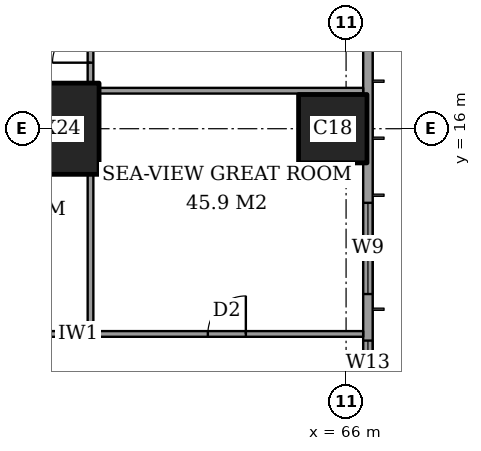
"""IFC4 building model, lengths in metres.
Left out: names, types, materials, properties, quantities, classifications, styles, units other than length and angle.
Written with IfcOpenShell. Run it as: python <this file> out.ifc"""

import sys

from ifc_helpers import new_model, si_unit, direction, frame, frame_2d, origin, origin_2d, place, context, subcontext, project, spatial, rectangle, extrude, element, fill, save


model = new_model("IFC4")
c1 = context("Model", 3, precision=1e-05, world=origin(), true_north=direction((0.0, 1.0)))
c2 = subcontext(c1, "Body", "Model", "MODEL_VIEW")
j1 = project(units=[si_unit("LENGTHUNIT", "METRE"), si_unit("PLANEANGLEUNIT", "RADIAN")], contexts=[c1])
p1 = place(None, origin())
s1 = spatial("IfcSite", under=j1, at=p1, CompositionType="ELEMENT")
p2 = place(p1, origin())
s2 = spatial("IfcBuilding", under=s1, at=p2, CompositionType="ELEMENT")
p3 = place(p2, frame((0.0, 0.0, 196.6)))
s3 = spatial("IfcBuildingStorey", under=s2, at=p3, CompositionType="ELEMENT", Elevation=196.6)
p4 = place(p3, frame((58.0, 16.0, 0.0), z_axis=(0.0, 0.0, 1.0), x_axis=(1.0, 0.0, 0.0)))
e1 = element("IfcColumn", 1, at=p4, inside=s3, PredefinedType="COLUMN", context=c2, shape_type="SweptSolid", body=[
    extrude(rectangle(XDim=3.0, YDim=2.4, at=origin_2d()), origin(), (0.0, 0.0, 1.0), 3.6),
])
p5 = place(p3, frame((65.65, 16.0, 0.0), z_axis=(0.0, 0.0, 1.0), x_axis=(1.0, 0.0, 0.0)))
e2 = element("IfcColumn", 2, at=p5, inside=s3, PredefinedType="COLUMN", context=c2, shape_type="SweptSolid", body=[
    extrude(rectangle(XDim=1.8, YDim=1.8, at=origin_2d()), origin(), (0.0, 0.0, 1.0), 3.6),
])
p6 = place(p3, frame((66.575, 3.175, 0.0), z_axis=(0.0, 0.0, 1.0), x_axis=(0.0, 1.0, 0.0)))
e3 = element("IfcWall", 3, at=p6, inside=s3, PredefinedType="SOLIDWALL", context=c2, shape_type="SweptSolid", body=[
    extrude(rectangle(XDim=41.65, YDim=0.25, at=frame_2d((20.825, 0.0))), origin(), (0.0, 0.0, 1.0), 3.6),
])
p7 = place(p6, frame((0.825, 0.0, 0.2)))
e4 = element("IfcOpeningElement", 4, at=p7, cuts=e3, PredefinedType="OPENING", context=c2, shape_type="SweptSolid", body=[
    extrude(rectangle(XDim=2.4, YDim=2.4, at=frame_2d((1.2, 1.2))), frame((0.0, 0.135, 0.0), z_axis=(0.0, -1.0, 0.0), x_axis=(1.0, 0.0, 0.0)), (0.0, 0.0, 1.0), 0.27),
])
p8 = place(p6, frame((6.05, 0.0, 0.2)))
e5 = element("IfcOpeningElement", 5, at=p8, cuts=e3, PredefinedType="OPENING", context=c2, shape_type="SweptSolid", body=[
    extrude(rectangle(XDim=1.2, YDim=2.4, at=frame_2d((0.6, 1.2))), frame((0.0, 0.135, 0.0), z_axis=(0.0, -1.0, 0.0), x_axis=(1.0, 0.0, 0.0)), (0.0, 0.0, 1.0), 0.27),
])
p9 = place(p6, frame((8.475, 0.0, 0.2)))
e6 = element("IfcOpeningElement", 6, at=p9, cuts=e3, PredefinedType="OPENING", context=c2, shape_type="SweptSolid", body=[
    extrude(rectangle(XDim=2.4, YDim=2.4, at=frame_2d((1.2, 1.2))), frame((0.0, 0.135, 0.0), z_axis=(0.0, -1.0, 0.0), x_axis=(1.0, 0.0, 0.0)), (0.0, 0.0, 1.0), 0.27),
])
p10 = place(p6, frame((15.675, 0.0, 0.2)))
e7 = element("IfcOpeningElement", 7, at=p10, cuts=e3, PredefinedType="OPENING", context=c2, shape_type="SweptSolid", body=[
    extrude(rectangle(XDim=2.4, YDim=2.4, at=frame_2d((1.2, 1.2))), frame((0.0, 0.135, 0.0), z_axis=(0.0, -1.0, 0.0), x_axis=(1.0, 0.0, 0.0)), (0.0, 0.0, 1.0), 0.27),
])
p11 = place(p6, frame((23.625, 0.0, 0.2)))
e8 = element("IfcOpeningElement", 8, at=p11, cuts=e3, PredefinedType="OPENING", context=c2, shape_type="SweptSolid", body=[
    extrude(rectangle(XDim=2.4, YDim=2.4, at=frame_2d((1.2, 1.2))), frame((0.0, 0.135, 0.0), z_axis=(0.0, -1.0, 0.0), x_axis=(1.0, 0.0, 0.0)), (0.0, 0.0, 1.0), 0.27),
])
p12 = place(p6, frame((30.775, 0.0, 0.2)))
e9 = element("IfcOpeningElement", 9, at=p12, cuts=e3, PredefinedType="OPENING", context=c2, shape_type="SweptSolid", body=[
    extrude(rectangle(XDim=2.4, YDim=2.4, at=frame_2d((1.2, 1.2))), frame((0.0, 0.135, 0.0), z_axis=(0.0, -1.0, 0.0), x_axis=(1.0, 0.0, 0.0)), (0.0, 0.0, 1.0), 0.27),
])
p13 = place(p6, frame((34.55, 0.0, 0.2)))
e10 = element("IfcOpeningElement", 10, at=p13, cuts=e3, PredefinedType="OPENING", context=c2, shape_type="SweptSolid", body=[
    extrude(rectangle(XDim=1.2, YDim=2.4, at=frame_2d((0.6, 1.2))), frame((0.0, 0.135, 0.0), z_axis=(0.0, -1.0, 0.0), x_axis=(1.0, 0.0, 0.0)), (0.0, 0.0, 1.0), 0.27),
])
p14 = place(p6, frame((38.425, 0.0, 0.2)))
e11 = element("IfcOpeningElement", 11, at=p14, cuts=e3, PredefinedType="OPENING", context=c2, shape_type="SweptSolid", body=[
    extrude(rectangle(XDim=2.4, YDim=2.4, at=frame_2d((1.2, 1.2))), frame((0.0, 0.135, 0.0), z_axis=(0.0, -1.0, 0.0), x_axis=(1.0, 0.0, 0.0)), (0.0, 0.0, 1.0), 0.27),
])
p15 = place(p3, frame((41.439, 10.6, 0.0), z_axis=(0.0, 0.0, 1.0), x_axis=(1.0, 0.0, 0.0)))
e12 = element("IfcWall", 12, at=p15, inside=s3, PredefinedType="PARTITIONING", context=c2, shape_type="SweptSolid", body=[
    extrude(rectangle(XDim=25.011, YDim=0.15, at=frame_2d((12.505, 0.0))), origin(), (0.0, 0.0, 1.0), 3.35),
])
p16 = place(p15, frame((11.961, 0.0, 0.0)))
e13 = element("IfcOpeningElement", 13, at=p16, cuts=e12, PredefinedType="OPENING", context=c2, shape_type="SweptSolid", body=[
    extrude(rectangle(XDim=1.0, YDim=2.1, at=frame_2d((0.5, 1.05))), frame((0.0, 0.085, 0.0), z_axis=(0.0, -1.0, 0.0), x_axis=(1.0, 0.0, 0.0)), (0.0, 0.0, 1.0), 0.17),
])
p17 = place(p15, frame((20.924, 0.0, 0.0)))
e14 = element("IfcOpeningElement", 14, at=p17, cuts=e12, PredefinedType="OPENING", context=c2, shape_type="SweptSolid", body=[
    extrude(rectangle(XDim=1.0, YDim=2.1, at=frame_2d((0.5, 1.05))), frame((0.0, 0.085, 0.0), z_axis=(0.0, -1.0, 0.0), x_axis=(1.0, 0.0, 0.0)), (0.0, 0.0, 1.0), 0.17),
])
p18 = place(p15, frame((15.249, 0.0, 0.0)))
e15 = element("IfcOpeningElement", 15, at=p18, cuts=e12, PredefinedType="OPENING", context=c2, shape_type="SweptSolid", body=[
    extrude(rectangle(XDim=0.9, YDim=2.1, at=frame_2d((0.45, 1.05))), frame((0.0, 0.085, 0.0), z_axis=(0.0, -1.0, 0.0), x_axis=(1.0, 0.0, 0.0)), (0.0, 0.0, 1.0), 0.17),
])
p19 = place(p15, frame((9.661, 0.0, 0.0)))
e16 = element("IfcOpeningElement", 16, at=p19, cuts=e12, PredefinedType="OPENING", context=c2, shape_type="SweptSolid", body=[
    extrude(rectangle(XDim=1.0, YDim=2.1, at=frame_2d((0.5, 1.05))), frame((0.0, 0.085, 0.0), z_axis=(0.0, -1.0, 0.0), x_axis=(1.0, 0.0, 0.0)), (0.0, 0.0, 1.0), 0.17),
])
p20 = place(p15, frame((7.311, 0.0, 0.0)))
e17 = element("IfcOpeningElement", 17, at=p20, cuts=e12, PredefinedType="OPENING", context=c2, shape_type="SweptSolid", body=[
    extrude(rectangle(XDim=0.9, YDim=2.1, at=frame_2d((0.45, 1.05))), frame((0.0, 0.085, 0.0), z_axis=(0.0, -1.0, 0.0), x_axis=(1.0, 0.0, 0.0)), (0.0, 0.0, 1.0), 0.17),
])
p21 = place(p15, frame((2.836, 0.0, 0.0)))
e18 = element("IfcOpeningElement", 18, at=p21, cuts=e12, PredefinedType="OPENING", context=c2, shape_type="SweptSolid", body=[
    extrude(rectangle(XDim=1.0, YDim=2.1, at=frame_2d((0.5, 1.05))), frame((0.0, 0.085, 0.0), z_axis=(0.0, -1.0, 0.0), x_axis=(1.0, 0.0, 0.0)), (0.0, 0.0, 1.0), 0.17),
])
p22 = place(p3, frame((59.5, 17.0, 0.0), z_axis=(0.0, 0.0, 1.0), x_axis=(1.0, 0.0, 0.0)))
e19 = element("IfcWall", 19, at=p22, inside=s3, PredefinedType="PARTITIONING", context=c2, shape_type="SweptSolid", body=[
    extrude(rectangle(XDim=6.95, YDim=0.15, at=frame_2d((3.475, 0.0))), origin(), (0.0, 0.0, 1.0), 3.35),
])
p23 = place(p3, frame((59.275, 10.6, 0.0), z_axis=(0.0, 0.0, 1.0), x_axis=(0.0, 1.0, 0.0)))
e20 = element("IfcWall", 20, at=p23, inside=s3, PredefinedType="PARTITIONING", context=c2, shape_type="SweptSolid", body=[
    extrude(rectangle(XDim=4.2, YDim=0.15, at=frame_2d((2.1, 0.0))), origin(), (0.0, 0.0, 1.0), 3.35),
])
p24 = place(p3, frame((59.275, 17.2, 0.0), z_axis=(0.0, 0.0, 1.0), x_axis=(0.0, 1.0, 0.0)))
e21 = element("IfcWall", 21, at=p24, inside=s3, PredefinedType="PARTITIONING", context=c2, shape_type="SweptSolid", body=[
    extrude(rectangle(XDim=2.45, YDim=0.15, at=frame_2d((1.225, 0.0))), origin(), (0.0, 0.0, 1.0), 3.35),
])
p25 = place(p24, frame((0.538, 0.0, 0.0)))
e22 = element("IfcOpeningElement", 22, at=p25, cuts=e21, PredefinedType="OPENING", context=c2, shape_type="SweptSolid", body=[
    extrude(rectangle(XDim=1.0, YDim=2.1, at=frame_2d((0.5, 1.05))), frame((0.0, 0.085, 0.0), z_axis=(0.0, -1.0, 0.0), x_axis=(1.0, 0.0, 0.0)), (0.0, 0.0, 1.0), 0.17),
])
p26 = place(p8, origin())
e23 = element("IfcWindow", 23, at=p26, inside=s3, PartitioningType="SINGLE_PANEL", PredefinedType="WINDOW", context=c2, shape_type="SweptSolid", body=[
    extrude(rectangle(XDim=1.2, YDim=2.4, at=frame_2d((0.6, 1.2))), frame((0.0, 0.03, 0.0), z_axis=(0.0, -1.0, 0.0), x_axis=(1.0, 0.0, 0.0)), (0.0, 0.0, 1.0), 0.06),
])
fill(e5, e23)
p27 = place(p9, origin())
e24 = element("IfcWindow", 24, at=p27, inside=s3, PartitioningType="SINGLE_PANEL", PredefinedType="WINDOW", context=c2, shape_type="SweptSolid", body=[
    extrude(rectangle(XDim=2.4, YDim=2.4, at=frame_2d((1.2, 1.2))), frame((0.0, 0.03, 0.0), z_axis=(0.0, -1.0, 0.0), x_axis=(1.0, 0.0, 0.0)), (0.0, 0.0, 1.0), 0.06),
])
fill(e6, e24)
p28 = place(p17, origin())
e25 = element("IfcDoor", 25, at=p28, inside=s3, OperationType="SINGLE_SWING_LEFT", PredefinedType="DOOR", context=c2, shape_type="SweptSolid", body=[
    extrude(rectangle(XDim=1.0, YDim=2.1, at=frame_2d((0.5, 1.05))), frame((0.0, 0.025, 0.0), z_axis=(0.0, -1.0, 0.0), x_axis=(1.0, 0.0, 0.0)), (0.0, 0.0, 1.0), 0.05),
])
fill(e14, e25)
p29 = place(p25, origin())
e26 = element("IfcDoor", 26, at=p29, inside=s3, OperationType="SINGLE_SWING_RIGHT", PredefinedType="DOOR", context=c2, shape_type="SweptSolid", body=[
    extrude(rectangle(XDim=1.0, YDim=2.1, at=frame_2d((0.5, 1.05))), frame((0.0, 0.025, 0.0), z_axis=(0.0, -1.0, 0.0), x_axis=(1.0, 0.0, 0.0)), (0.0, 0.0, 1.0), 0.05),
])
fill(e22, e26)
save(model, sys.argv[1])
